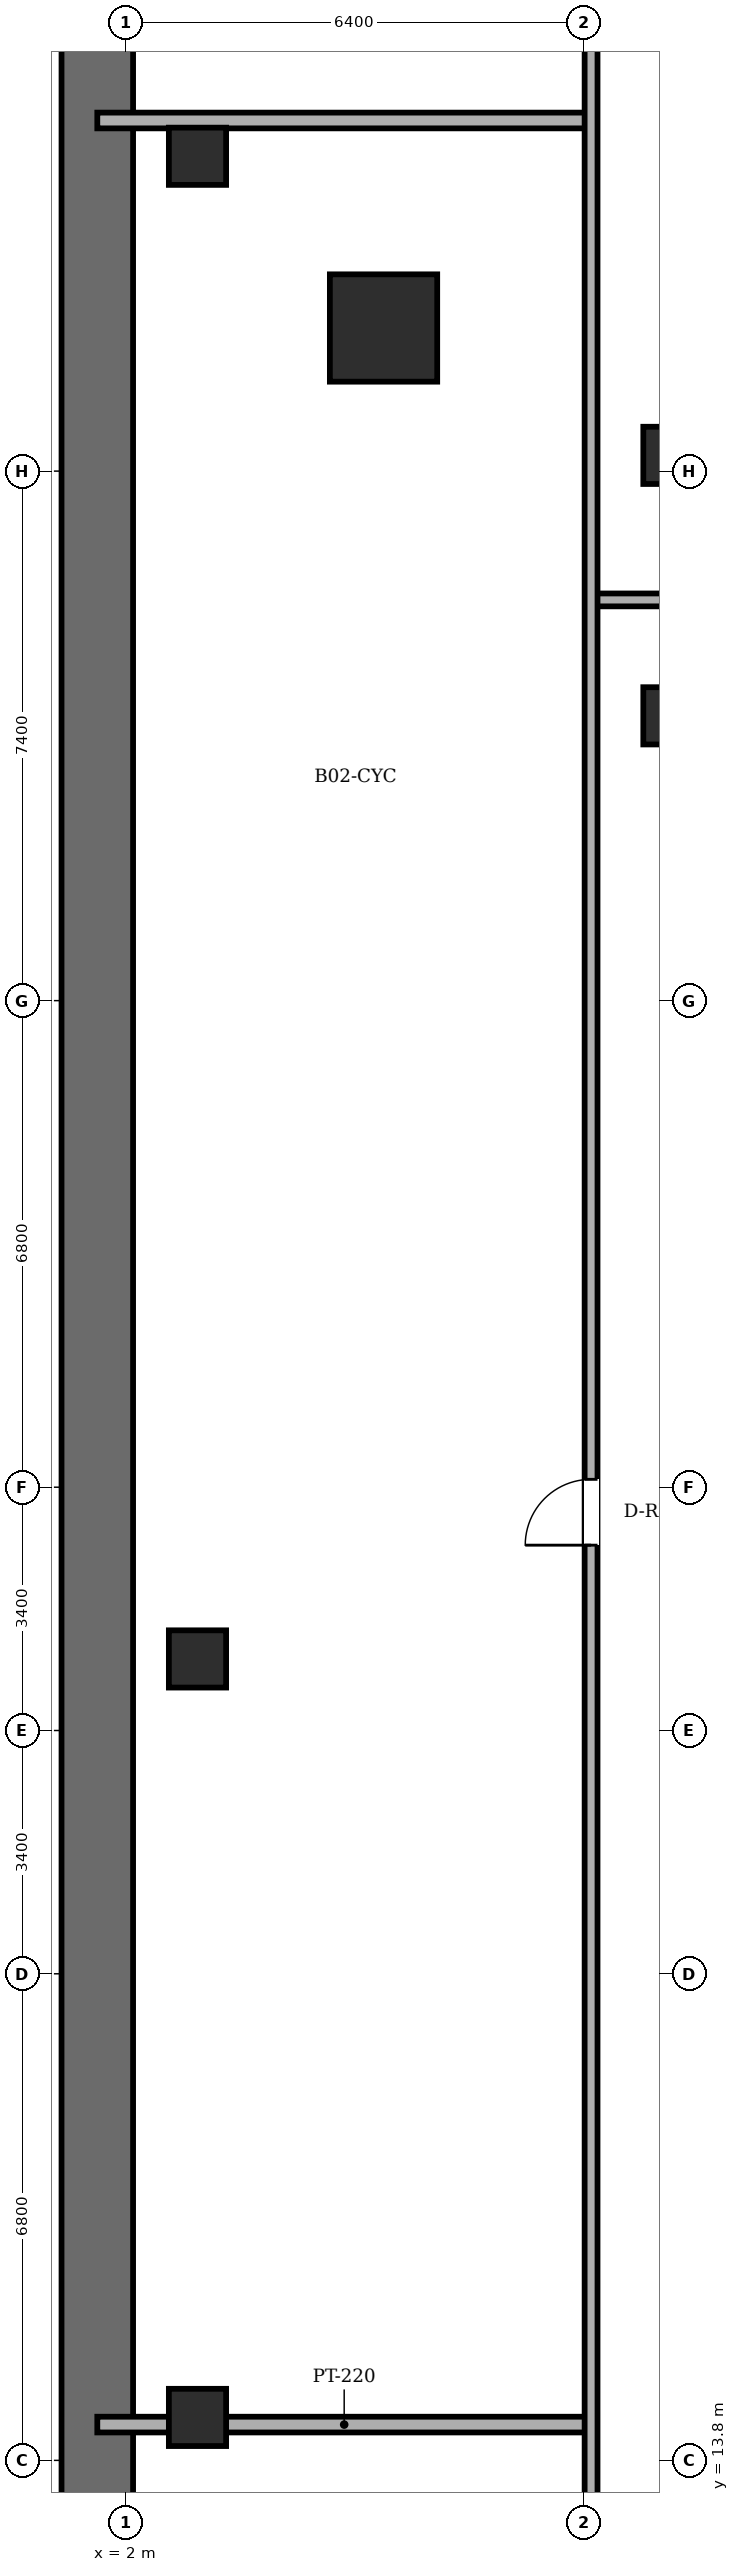
"""IFC4 building model, lengths in metres.
Left out: names, types, materials, properties, quantities, classifications, styles, units other than length and angle.
Written with IfcOpenShell. Run it as: python <this file> out.ifc"""

import sys

from ifc_helpers import new_model, si_unit, direction, frame, frame_2d, origin, origin_2d, place, context, subcontext, project, spatial, rectangle, circle, extrude, element, fill, save


model = new_model("IFC4")
c1 = context("Model", 3, precision=1e-05, world=origin(), true_north=direction((0.0, 1.0)))
c2 = subcontext(c1, "Body", "Model", "MODEL_VIEW")
j1 = project(units=[si_unit("LENGTHUNIT", "METRE"), si_unit("PLANEANGLEUNIT", "RADIAN")], contexts=[c1])
p1 = place(None, origin())
s1 = spatial("IfcSite", under=j1, at=p1, CompositionType="ELEMENT")
p2 = place(p1, origin())
s2 = spatial("IfcBuilding", under=s1, at=p2, CompositionType="ELEMENT")
p3 = place(p2, frame((0.0, 0.0, -8.4)))
s3 = spatial("IfcBuildingStorey", under=s2, at=p3, CompositionType="ELEMENT", Elevation=-8.4)
p4 = place(p3, frame((5.6, 43.6, 0.0), z_axis=(0.0, 0.0, 1.0), x_axis=(1.0, 0.0, 0.0)))
e1 = element("IfcColumn", 1, at=p4, inside=s3, PredefinedType="COLUMN", context=c2, shape_type="SweptSolid", body=[
    extrude(circle(Radius=0.75, at=origin_2d()), origin(), (0.0, 0.0, 1.0), 4.2),
])
for number, where, z_axis, x_axis in (
    (2, (3.0, 46.0, 0.0), (0.0, 0.0, 1.0), (1.0, 0.0, 0.0)),
    (3, (3.0, 14.4, 0.0), (0.0, 0.0, 1.0), (1.0, 0.0, 0.0)),
    (4, (3.0, 25.0, 0.0), (0.0, 0.0, 1.0), (1.0, 0.0, 0.0)),
    (5, (9.63, 38.18, 0.0), (0.0, 0.0, 1.0), (1.0, 0.0, 0.0)),
    (6, (9.63, 41.82, 0.0), (0.0, 0.0, 1.0), (1.0, 0.0, 0.0)),
):
    element("IfcColumn", number, at=place(p3, frame(where, z_axis=z_axis, x_axis=x_axis)), inside=s3, PredefinedType="COLUMN", context=c2, shape_type="SweptSolid", body=[
        extrude(rectangle(XDim=0.8, YDim=0.8, at=origin_2d()), origin(), (0.0, 0.0, 1.0), 4.2),
    ])
p5 = place(p3, frame((1.6, 48.0, 0.0), z_axis=(0.0, 0.0, 1.0), x_axis=(0.0, -1.0, 0.0)))
e7 = element("IfcWall", 7, at=p5, inside=s3, PredefinedType="SOLIDWALL", context=c2, shape_type="SweptSolid", body=[
    extrude(rectangle(XDim=48.0, YDim=1.0, at=frame_2d((24.0, 0.0))), origin(), (0.0, 0.0, 1.0), 3.95),
])
p6 = place(p3, frame((1.6, 14.3, 0.0), z_axis=(0.0, 0.0, 1.0), x_axis=(1.0, 0.0, 0.0)))
e8 = element("IfcWall", 8, at=p6, inside=s3, PredefinedType="PARTITIONING", context=c2, shape_type="SweptSolid", body=[
    extrude(rectangle(XDim=6.9, YDim=0.22, at=frame_2d((3.45, 0.0))), origin(), (0.0, 0.0, 1.0), 3.482),
])
p7 = place(p3, frame((8.5, 39.8, 0.0), z_axis=(0.0, 0.0, 1.0), x_axis=(1.0, 0.0, 0.0)))
e9 = element("IfcWall", 9, at=p7, inside=s3, PredefinedType="PARTITIONING", context=c2, shape_type="SweptSolid", body=[
    extrude(rectangle(XDim=49.9, YDim=0.18, at=frame_2d((24.95, 0.0))), origin(), (0.0, 0.0, 1.0), 3.95),
])
p8 = place(p7, frame((18.74, 0.0, 0.0)))
e10 = element("IfcOpeningElement", 10, at=p8, cuts=e9, PredefinedType="OPENING", context=c2, shape_type="SweptSolid", body=[
    extrude(rectangle(XDim=0.92, YDim=2.1, at=frame_2d((0.46, 1.05))), frame((0.0, 0.1, 0.0), z_axis=(0.0, -1.0, 0.0), x_axis=(1.0, 0.0, 0.0)), (0.0, 0.0, 1.0), 0.2),
])
p9 = place(p3, frame((1.6, 46.5, 0.0), z_axis=(0.0, 0.0, 1.0), x_axis=(1.0, 0.0, 0.0)))
e11 = element("IfcWall", 11, at=p9, inside=s3, PredefinedType="PARTITIONING", context=c2, shape_type="SweptSolid", body=[
    extrude(rectangle(XDim=6.9, YDim=0.22, at=frame_2d((3.45, 0.0))), origin(), (0.0, 0.0, 1.0), 3.95),
])
p10 = place(p3, frame((8.5, 8.2, 0.0), z_axis=(0.0, 0.0, 1.0), x_axis=(0.0, 1.0, 0.0)))
e12 = element("IfcWall", 12, at=p10, inside=s3, PredefinedType="PARTITIONING", context=c2, shape_type="SweptSolid", body=[
    extrude(rectangle(XDim=39.8, YDim=0.18, at=frame_2d((19.9, 0.0))), origin(), (0.0, 0.0, 1.0), 3.95),
])
p11 = place(p10, frame((18.39, 0.0, 0.0)))
e13 = element("IfcOpeningElement", 13, at=p11, cuts=e12, PredefinedType="OPENING", context=c2, shape_type="SweptSolid", body=[
    extrude(rectangle(XDim=0.92, YDim=2.1, at=frame_2d((0.46, 1.05))), frame((0.0, 0.1, 0.0), z_axis=(0.0, -1.0, 0.0), x_axis=(1.0, 0.0, 0.0)), (0.0, 0.0, 1.0), 0.2),
])
p12 = place(p11, origin())
e14 = element("IfcDoor", 14, at=p12, inside=s3, OperationType="SINGLE_SWING_LEFT", PredefinedType="DOOR", context=c2, shape_type="SweptSolid", body=[
    extrude(rectangle(XDim=0.92, YDim=2.1, at=frame_2d((0.46, 1.05))), frame((0.0, 0.025, 0.0), z_axis=(0.0, -1.0, 0.0), x_axis=(1.0, 0.0, 0.0)), (0.0, 0.0, 1.0), 0.05),
])
fill(e13, e14)
save(model, sys.argv[1])
